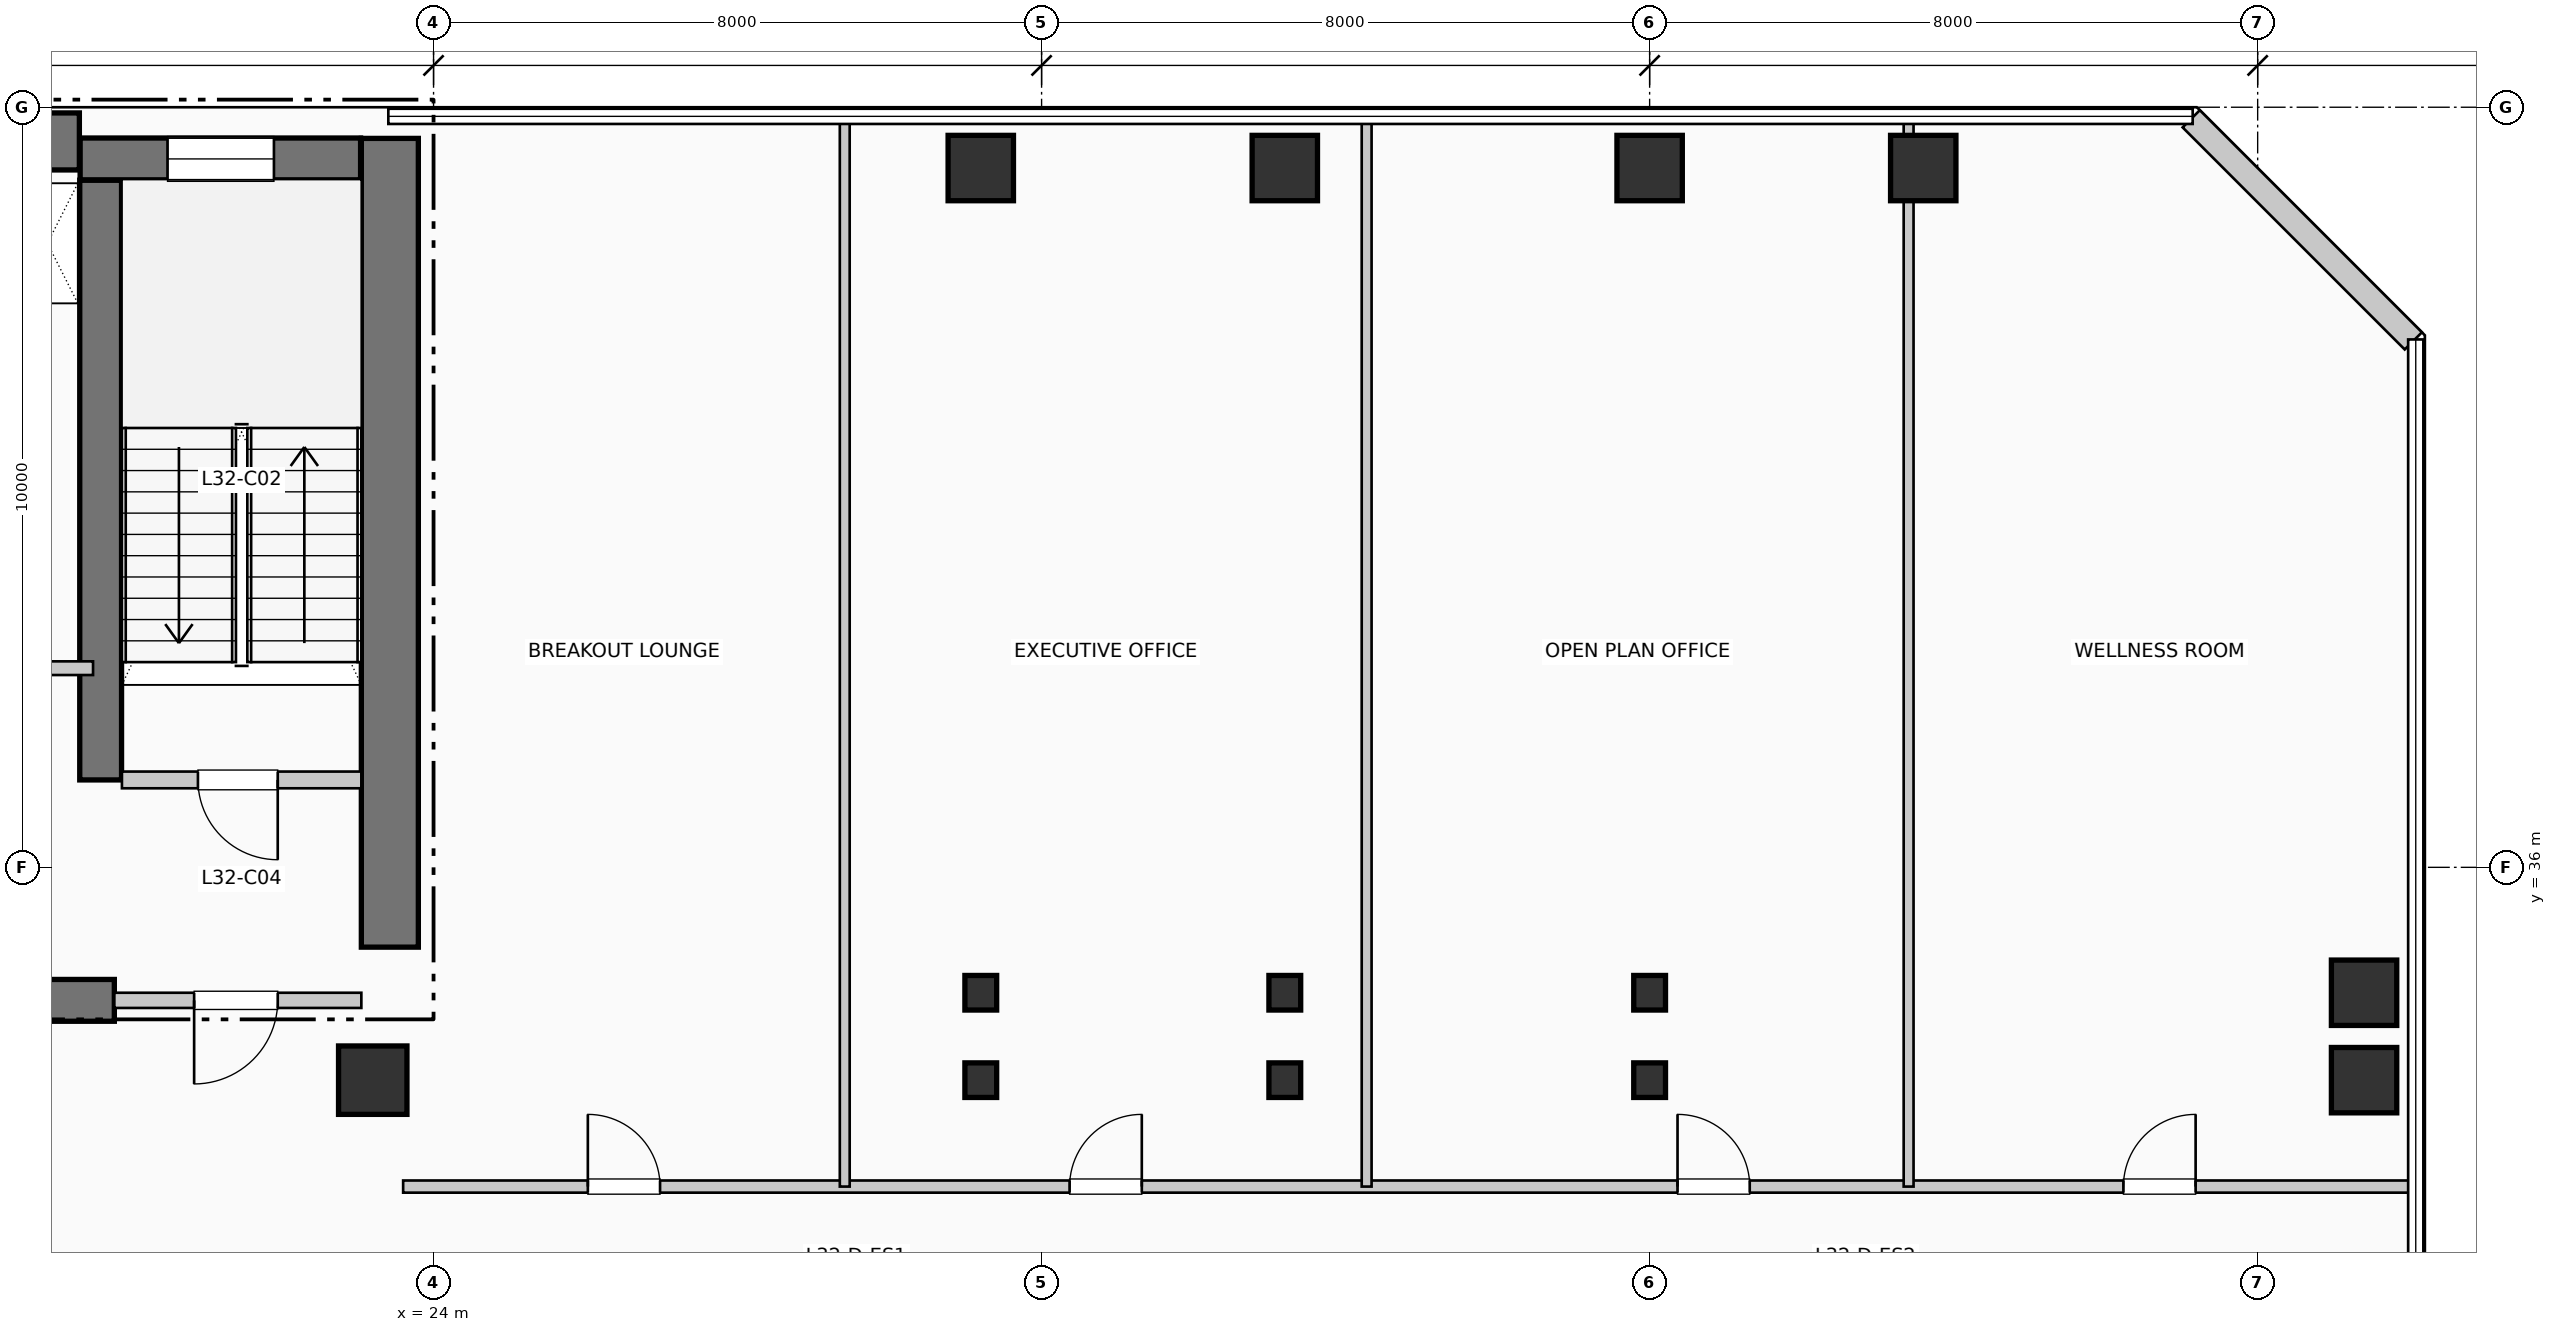
"""IFC4 building model, lengths in metres.
Left out: names, types, materials, properties, quantities, classifications, styles, units other than length and angle.
Written with IfcOpenShell. Run it as: python <this file> out.ifc"""

import sys

from ifc_helpers import new_model, si_unit, direction, frame, frame_2d, origin, origin_2d, place, context, subcontext, project, spatial, rectangle, i_section, extrude, element, fill, save


model = new_model("IFC4")
c1 = context("Model", 3, precision=1e-05, world=origin(), true_north=direction((0.0, 1.0)))
c2 = subcontext(c1, "Body", "Model", "MODEL_VIEW")
j1 = project(units=[si_unit("LENGTHUNIT", "METRE"), si_unit("PLANEANGLEUNIT", "RADIAN")], contexts=[c1])
p1 = place(None, origin())
s1 = spatial("IfcSite", under=j1, at=p1, CompositionType="ELEMENT")
p2 = place(p1, origin())
s2 = spatial("IfcBuilding", under=s1, at=p2, CompositionType="ELEMENT")
p3 = place(p2, frame((0.0, 0.0, 134.97)))
s3 = spatial("IfcBuildingStorey", under=s2, at=p3, CompositionType="ELEMENT", Elevation=134.97)
p4 = place(p3, frame((5.36, 45.55, 0.0), z_axis=(0.0, 0.0, 1.0), x_axis=(1.0, 0.0, 0.0)))
e1 = element("IfcWall", 1, at=p4, inside=s3, PredefinedType="SHEAR", context=c2, shape_type="SweptSolid", body=[
    extrude(rectangle(XDim=13.98, YDim=0.75, at=frame_2d((6.99, 0.0))), origin(), (0.0, 0.0, 1.0), 3.96),
])
p5 = place(p3, frame((23.425, 34.95, 0.0), z_axis=(0.0, 0.0, 1.0), x_axis=(0.0, 1.0, 0.0)))
e2 = element("IfcWall", 2, at=p5, inside=s3, PredefinedType="SHEAR", context=c2, shape_type="SweptSolid", body=[
    extrude(rectangle(XDim=10.64, YDim=0.75, at=frame_2d((5.32, 0.0))), origin(), (0.0, 0.0, 1.0), 3.96),
])
p6 = place(p3, frame((13.68, 34.25, 0.0), z_axis=(0.0, 0.0, 1.0), x_axis=(1.0, 0.0, 0.0)))
e3 = element("IfcWall", 3, at=p6, inside=s3, PredefinedType="SHEAR", context=c2, shape_type="SweptSolid", body=[
    extrude(rectangle(XDim=6.12, YDim=0.55, at=frame_2d((3.06, 0.0))), origin(), (0.0, 0.0, 1.0), 3.96),
])
p7 = place(p3, frame((19.62, 37.15, 0.0), z_axis=(0.0, 0.0, 1.0), x_axis=(0.0, 1.0, 0.0)))
e4 = element("IfcWall", 4, at=p7, inside=s3, PredefinedType="SHEAR", context=c2, shape_type="SweptSolid", body=[
    extrude(rectangle(XDim=7.89, YDim=0.55, at=frame_2d((3.945, 0.0))), origin(), (0.0, 0.0, 1.0), 3.96),
])
p8 = place(p3, frame((19.35, 45.32, 0.0), z_axis=(0.0, 0.0, 1.0), x_axis=(1.0, 0.0, 0.0)))
e5 = element("IfcWall", 5, at=p8, inside=s3, PredefinedType="SHEAR", context=c2, shape_type="SweptSolid", body=[
    extrude(rectangle(XDim=3.69, YDim=0.55, at=frame_2d((1.845, 0.0))), origin(), (0.0, 0.0, 1.0), 3.96),
])
p9 = place(p8, frame((1.15, 0.0, 1.05)))
e6 = element("IfcOpeningElement", 6, at=p9, cuts=e5, PredefinedType="OPENING", context=c2, shape_type="SweptSolid", body=[
    extrude(rectangle(XDim=1.4, YDim=1.8, at=frame_2d((0.7, 0.9))), frame((0.0, 0.285, 0.0), z_axis=(0.0, -1.0, 0.0), x_axis=(1.0, 0.0, 0.0)), (0.0, 0.0, 1.0), 0.57),
])
p10 = place(p3, frame((23.2, 33.2, 0.0), z_axis=(0.0, 0.0, 1.0), x_axis=(1.0, 0.0, 0.0)))
e7 = element("IfcColumn", 7, at=p10, inside=s3, PredefinedType="COLUMN", context=c2, shape_type="SweptSolid", body=[
    extrude(rectangle(XDim=0.9, YDim=0.9, at=origin_2d()), origin(), (0.0, 0.0, 1.0), 3.96),
])
for number, where, z_axis, x_axis in (
    (8, (31.2, 33.2, 0.0), (0.0, 0.0, 1.0), (1.0, 0.0, 0.0)),
    (9, (31.2, 34.35, 0.0), (0.0, 0.0, 1.0), (1.0, 0.0, 0.0)),
):
    element("IfcColumn", number, at=place(p3, frame(where, z_axis=z_axis, x_axis=x_axis)), inside=s3, PredefinedType="COLUMN", context=c2, shape_type="SweptSolid", body=[
        extrude(i_section(OverallWidth=0.418, OverallDepth=0.455, WebThickness=0.032, FlangeThickness=0.051, at=origin_2d()), origin(), (0.0, 0.0, 1.0), 3.96),
    ])
p11 = place(p3, frame((31.2, 45.2, 0.0), z_axis=(0.0, 0.0, 1.0), x_axis=(1.0, 0.0, 0.0)))
e10 = element("IfcColumn", 10, at=p11, inside=s3, PredefinedType="COLUMN", context=c2, shape_type="SweptSolid", body=[
    extrude(rectangle(XDim=0.86, YDim=0.86, at=origin_2d()), origin(), (0.0, 0.0, 1.0), 3.96),
])
for number, where, z_axis, x_axis in (
    (11, (35.2, 33.2, 0.0), (0.0, 0.0, 1.0), (1.0, 0.0, 0.0)),
    (12, (35.2, 34.35, 0.0), (0.0, 0.0, 1.0), (1.0, 0.0, 0.0)),
):
    element("IfcColumn", number, at=place(p3, frame(where, z_axis=z_axis, x_axis=x_axis)), inside=s3, PredefinedType="COLUMN", context=c2, shape_type="SweptSolid", body=[
        extrude(i_section(OverallWidth=0.418, OverallDepth=0.455, WebThickness=0.032, FlangeThickness=0.051, at=origin_2d()), origin(), (0.0, 0.0, 1.0), 3.96),
    ])
p12 = place(p3, frame((35.2, 45.2, 0.0), z_axis=(0.0, 0.0, 1.0), x_axis=(1.0, 0.0, 0.0)))
e13 = element("IfcColumn", 13, at=p12, inside=s3, PredefinedType="COLUMN", context=c2, shape_type="SweptSolid", body=[
    extrude(rectangle(XDim=0.86, YDim=0.86, at=origin_2d()), origin(), (0.0, 0.0, 1.0), 3.96),
])
for number, where, z_axis, x_axis in (
    (14, (40.0, 33.2, 0.0), (0.0, 0.0, 1.0), (1.0, 0.0, 0.0)),
    (15, (40.0, 34.35, 0.0), (0.0, 0.0, 1.0), (1.0, 0.0, 0.0)),
):
    element("IfcColumn", number, at=place(p3, frame(where, z_axis=z_axis, x_axis=x_axis)), inside=s3, PredefinedType="COLUMN", context=c2, shape_type="SweptSolid", body=[
        extrude(i_section(OverallWidth=0.418, OverallDepth=0.455, WebThickness=0.032, FlangeThickness=0.051, at=origin_2d()), origin(), (0.0, 0.0, 1.0), 3.96),
    ])
for number, where, z_axis, x_axis in (
    (16, (40.0, 45.2, 0.0), (0.0, 0.0, 1.0), (1.0, 0.0, 0.0)),
    (17, (43.6, 45.2, 0.0), (0.0, 0.0, 1.0), (1.0, 0.0, 0.0)),
    (18, (49.4, 33.2, 0.0), (0.0, 0.0, 1.0), (1.0, 0.0, 0.0)),
    (19, (49.4, 34.35, 0.0), (0.0, 0.0, 1.0), (1.0, 0.0, 0.0)),
):
    element("IfcColumn", number, at=place(p3, frame(where, z_axis=z_axis, x_axis=x_axis)), inside=s3, PredefinedType="COLUMN", context=c2, shape_type="SweptSolid", body=[
        extrude(rectangle(XDim=0.86, YDim=0.86, at=origin_2d()), origin(), (0.0, 0.0, 1.0), 3.96),
    ])
p13 = place(p3, frame((50.048, 42.926, 0.0), z_axis=(0.0, 0.0, 1.0), x_axis=(-0.707136318428, 0.707077242712, 0.0)))
e20 = element("IfcWall", 20, at=p13, inside=s3, PredefinedType="SOLIDWALL", context=c2, shape_type="SweptSolid", body=[
    extrude(rectangle(XDim=4.133, YDim=0.32, at=frame_2d((2.066, 0.0))), origin(), (0.0, 0.0, 1.0), 3.71),
])
p14 = place(p3, frame((19.9, 37.15, 0.0), z_axis=(0.0, 0.0, 1.0), x_axis=(1.0, 0.0, 0.0)))
e21 = element("IfcWall", 21, at=p14, inside=s3, PredefinedType="PARTITIONING", context=c2, shape_type="SweptSolid", body=[
    extrude(rectangle(XDim=3.15, YDim=0.22, at=frame_2d((1.575, 0.0))), origin(), (0.0, 0.0, 1.0), 3.71),
])
p15 = place(p14, frame((2.05, 0.0, 0.0), z_axis=(0.0, 0.0, 1.0), x_axis=(-1.0, 0.0, 0.0)))
e22 = element("IfcOpeningElement", 22, at=p15, cuts=e21, PredefinedType="OPENING", context=c2, shape_type="SweptSolid", body=[
    extrude(rectangle(XDim=1.05, YDim=2.15, at=frame_2d((0.525, 1.075))), frame((0.0, 0.12, 0.0), z_axis=(0.0, -1.0, 0.0), x_axis=(1.0, 0.0, 0.0)), (0.0, 0.0, 1.0), 0.24),
])
p16 = place(p3, frame((19.8, 34.25, 0.0), z_axis=(0.0, 0.0, 1.0), x_axis=(1.0, 0.0, 0.0)))
e23 = element("IfcWall", 23, at=p16, inside=s3, PredefinedType="PARTITIONING", context=c2, shape_type="SweptSolid", body=[
    extrude(rectangle(XDim=3.25, YDim=0.2, at=frame_2d((1.625, 0.0))), origin(), (0.0, 0.0, 1.0), 3.71),
])
p17 = place(p16, frame((2.15, 0.0, 0.0), z_axis=(0.0, 0.0, 1.0), x_axis=(-1.0, 0.0, 0.0)))
e24 = element("IfcOpeningElement", 24, at=p17, cuts=e23, PredefinedType="OPENING", context=c2, shape_type="SweptSolid", body=[
    extrude(rectangle(XDim=1.1, YDim=2.15, at=frame_2d((0.55, 1.075))), frame((0.0, 0.11, 0.0), z_axis=(0.0, -1.0, 0.0), x_axis=(1.0, 0.0, 0.0)), (0.0, 0.0, 1.0), 0.22),
])
p18 = place(p3, frame((17.68, 38.62, 0.0), z_axis=(0.0, 0.0, 1.0), x_axis=(1.0, 0.0, 0.0)))
e25 = element("IfcWall", 25, at=p18, inside=s3, PredefinedType="PARTITIONING", context=c2, shape_type="SweptSolid", body=[
    extrude(rectangle(XDim=1.84, YDim=0.18, at=frame_2d((0.92, 0.0))), origin(), (0.0, 0.0, 1.0), 3.71),
])
p19 = place(p18, frame((0.24, 0.0, 0.0)))
e26 = element("IfcOpeningElement", 26, at=p19, cuts=e25, PredefinedType="OPENING", context=c2, shape_type="SweptSolid", body=[
    extrude(rectangle(XDim=0.92, YDim=2.1, at=frame_2d((0.46, 1.05))), frame((0.0, 0.1, 0.0), z_axis=(0.0, -1.0, 0.0), x_axis=(1.0, 0.0, 0.0)), (0.0, 0.0, 1.0), 0.2),
])
p20 = place(p3, frame((23.6, 31.8, 0.0), z_axis=(0.0, 0.0, 1.0), x_axis=(1.0, 0.0, 0.0)))
e27 = element("IfcWall", 27, at=p20, inside=s3, PredefinedType="PARTITIONING", context=c2, shape_type="SweptSolid", body=[
    extrude(rectangle(XDim=26.41, YDim=0.16, at=frame_2d((13.205, 0.0))), origin(), (0.0, 0.0, 1.0), 3.71),
])
p21 = place(p20, frame((2.43, 0.0, 0.0)))
e28 = element("IfcOpeningElement", 28, at=p21, cuts=e27, PredefinedType="OPENING", context=c2, shape_type="SweptSolid", body=[
    extrude(rectangle(XDim=0.95, YDim=2.15, at=frame_2d((0.475, 1.075))), frame((0.0, 0.09, 0.0), z_axis=(0.0, -1.0, 0.0), x_axis=(1.0, 0.0, 0.0)), (0.0, 0.0, 1.0), 0.18),
])
p22 = place(p20, frame((8.769, 0.0, 0.0)))
e29 = element("IfcOpeningElement", 29, at=p22, cuts=e27, PredefinedType="OPENING", context=c2, shape_type="SweptSolid", body=[
    extrude(rectangle(XDim=0.95, YDim=2.15, at=frame_2d((0.475, 1.075))), frame((0.0, 0.09, 0.0), z_axis=(0.0, -1.0, 0.0), x_axis=(1.0, 0.0, 0.0)), (0.0, 0.0, 1.0), 0.18),
])
p23 = place(p20, frame((16.767, 0.0, 0.0)))
e30 = element("IfcOpeningElement", 30, at=p23, cuts=e27, PredefinedType="OPENING", context=c2, shape_type="SweptSolid", body=[
    extrude(rectangle(XDim=0.95, YDim=2.15, at=frame_2d((0.475, 1.075))), frame((0.0, 0.09, 0.0), z_axis=(0.0, -1.0, 0.0), x_axis=(1.0, 0.0, 0.0)), (0.0, 0.0, 1.0), 0.18),
])
p24 = place(p20, frame((22.634, 0.0, 0.0)))
e31 = element("IfcOpeningElement", 31, at=p24, cuts=e27, PredefinedType="OPENING", context=c2, shape_type="SweptSolid", body=[
    extrude(rectangle(XDim=0.95, YDim=2.15, at=frame_2d((0.475, 1.075))), frame((0.0, 0.09, 0.0), z_axis=(0.0, -1.0, 0.0), x_axis=(1.0, 0.0, 0.0)), (0.0, 0.0, 1.0), 0.18),
])
for number, where, z_axis, x_axis in (
    (32, (29.41, 31.8, 0.0), (0.0, 0.0, 1.0), (0.0, 1.0, 0.0)),
    (33, (36.277, 31.8, 0.0), (0.0, 0.0, 1.0), (0.0, 1.0, 0.0)),
    (34, (43.407, 31.8, 0.0), (0.0, 0.0, 1.0), (0.0, 1.0, 0.0)),
):
    element("IfcWall", number, at=place(p3, frame(where, z_axis=z_axis, x_axis=x_axis)), inside=s3, PredefinedType="PARTITIONING", context=c2, shape_type="SweptSolid", body=[
        extrude(rectangle(XDim=14.01, YDim=0.13, at=frame_2d((7.005, 0.0))), origin(), (0.0, 0.0, 1.0), 3.71),
    ])
p25 = place(p9, origin())
e35 = element("IfcWindow", 35, at=p25, inside=s3, PartitioningType="SINGLE_PANEL", PredefinedType="WINDOW", context=c2, shape_type="SweptSolid", body=[
    extrude(rectangle(XDim=1.4, YDim=1.8, at=frame_2d((0.7, 0.9))), frame((0.0, 0.03, 0.0), z_axis=(0.0, -1.0, 0.0), x_axis=(1.0, 0.0, 0.0)), (0.0, 0.0, 1.0), 0.06),
])
fill(e6, e35)
p26 = place(p15, origin())
e36 = element("IfcDoor", 36, at=p26, inside=s3, OperationType="SINGLE_SWING_RIGHT", PredefinedType="DOOR", context=c2, shape_type="SweptSolid", body=[
    extrude(rectangle(XDim=1.05, YDim=2.15, at=frame_2d((0.525, 1.075))), frame((0.0, 0.025, 0.0), z_axis=(0.0, -1.0, 0.0), x_axis=(1.0, 0.0, 0.0)), (0.0, 0.0, 1.0), 0.05),
])
fill(e22, e36)
p27 = place(p17, origin())
e37 = element("IfcDoor", 37, at=p27, inside=s3, OperationType="SINGLE_SWING_LEFT", PredefinedType="DOOR", context=c2, shape_type="SweptSolid", body=[
    extrude(rectangle(XDim=1.1, YDim=2.15, at=frame_2d((0.55, 1.075))), frame((0.0, 0.025, 0.0), z_axis=(0.0, -1.0, 0.0), x_axis=(1.0, 0.0, 0.0)), (0.0, 0.0, 1.0), 0.05),
])
fill(e24, e37)
p28 = place(p21, origin())
e38 = element("IfcDoor", 38, at=p28, inside=s3, OperationType="SINGLE_SWING_LEFT", PredefinedType="DOOR", context=c2, shape_type="SweptSolid", body=[
    extrude(rectangle(XDim=0.95, YDim=2.15, at=frame_2d((0.475, 1.075))), frame((0.0, 0.025, 0.0), z_axis=(0.0, -1.0, 0.0), x_axis=(1.0, 0.0, 0.0)), (0.0, 0.0, 1.0), 0.05),
])
fill(e28, e38)
p29 = place(p22, origin())
e39 = element("IfcDoor", 39, at=p29, inside=s3, OperationType="SINGLE_SWING_RIGHT", PredefinedType="DOOR", context=c2, shape_type="SweptSolid", body=[
    extrude(rectangle(XDim=0.95, YDim=2.15, at=frame_2d((0.475, 1.075))), frame((0.0, 0.025, 0.0), z_axis=(0.0, -1.0, 0.0), x_axis=(1.0, 0.0, 0.0)), (0.0, 0.0, 1.0), 0.05),
])
fill(e29, e39)
p30 = place(p23, origin())
e40 = element("IfcDoor", 40, at=p30, inside=s3, OperationType="SINGLE_SWING_LEFT", PredefinedType="DOOR", context=c2, shape_type="SweptSolid", body=[
    extrude(rectangle(XDim=0.95, YDim=2.15, at=frame_2d((0.475, 1.075))), frame((0.0, 0.025, 0.0), z_axis=(0.0, -1.0, 0.0), x_axis=(1.0, 0.0, 0.0)), (0.0, 0.0, 1.0), 0.05),
])
fill(e30, e40)
p31 = place(p24, origin())
e41 = element("IfcDoor", 41, at=p31, inside=s3, OperationType="SINGLE_SWING_RIGHT", PredefinedType="DOOR", context=c2, shape_type="SweptSolid", body=[
    extrude(rectangle(XDim=0.95, YDim=2.15, at=frame_2d((0.475, 1.075))), frame((0.0, 0.025, 0.0), z_axis=(0.0, -1.0, 0.0), x_axis=(1.0, 0.0, 0.0)), (0.0, 0.0, 1.0), 0.05),
])
fill(e31, e41)
save(model, sys.argv[1])
